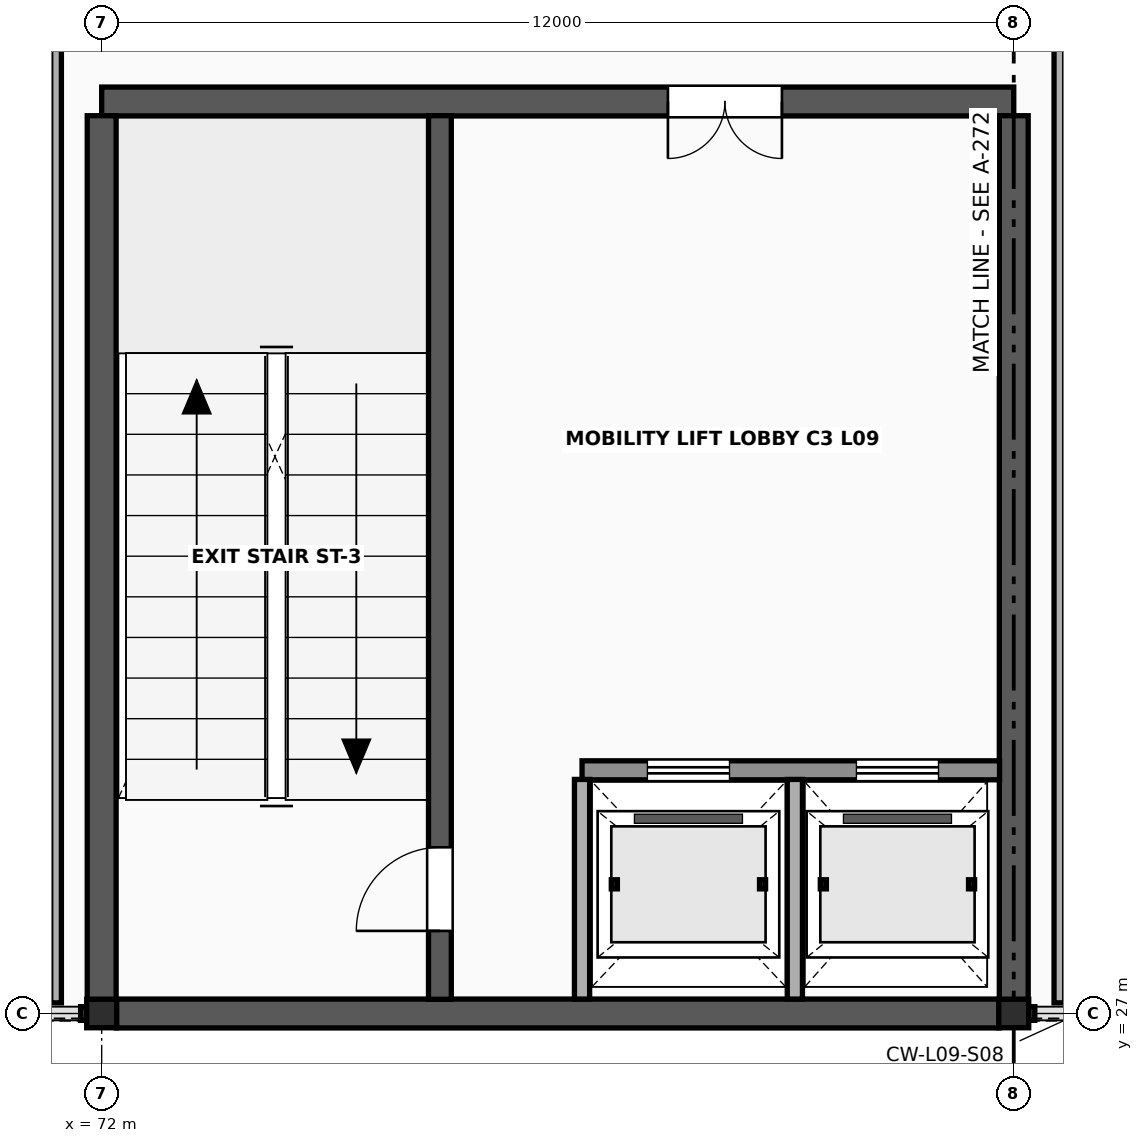
"""IFC4 building model, lengths in metres.
Left out: names, types, materials, properties, quantities, classifications, styles, units other than length and angle.
Written with IfcOpenShell. Run it as: python <this file> out.ifc"""

import sys

from ifc_helpers import new_model, si_unit, direction, frame, frame_2d, origin, origin_2d, place, context, subcontext, project, spatial, rectangle, i_section, extrude, element, fill, save


model = new_model("IFC4")
c1 = context("Model", 3, precision=1e-05, world=origin(), true_north=direction((0.0, 1.0)))
c2 = subcontext(c1, "Body", "Model", "MODEL_VIEW")
j1 = project(units=[si_unit("LENGTHUNIT", "METRE"), si_unit("PLANEANGLEUNIT", "RADIAN")], contexts=[c1])
p1 = place(None, origin())
s1 = spatial("IfcSite", under=j1, at=p1, CompositionType="ELEMENT")
p2 = place(p1, origin())
s2 = spatial("IfcBuilding", under=s1, at=p2, CompositionType="ELEMENT")
p3 = place(p2, frame((0.0, 0.0, 37.6)))
s3 = spatial("IfcBuildingStorey", under=s2, at=p3, CompositionType="ELEMENT", Elevation=37.6)
for number, where, z_axis, x_axis in (
    (1, (72.0, 27.0, 0.0), (0.0, 0.0, 1.0), (1.0, 0.0, 0.0)),
    (2, (84.0, 27.0, 0.0), (0.0, 0.0, 1.0), (1.0, 0.0, 0.0)),
):
    element("IfcColumn", number, at=place(p3, frame(where, z_axis=z_axis, x_axis=x_axis)), inside=s3, PredefinedType="COLUMN", context=c2, shape_type="SweptSolid", body=[
        extrude(i_section(OverallWidth=0.394, OverallDepth=0.375, WebThickness=0.017, FlangeThickness=0.028, FilletRadius=0.018, at=origin_2d()), origin(), (0.0, 0.0, 1.0), 4.0),
    ])
p4 = place(p3, frame((72.194, 27.0, 0.0), z_axis=(0.0, 0.0, 1.0), x_axis=(1.0, 0.0, 0.0)))
e3 = element("IfcWall", 3, at=p4, inside=s3, PredefinedType="SHEAR", context=c2, shape_type="SweptSolid", body=[
    extrude(rectangle(XDim=11.612, YDim=0.38, at=frame_2d((5.806, 0.0))), origin(), (0.0, 0.0, 1.0), 3.838),
])
p5 = place(p3, frame((72.0, 39.0, 0.0), z_axis=(0.0, 0.0, 1.0), x_axis=(1.0, 0.0, 0.0)))
e4 = element("IfcWall", 4, at=p5, inside=s3, PredefinedType="SHEAR", context=c2, shape_type="SweptSolid", body=[
    extrude(rectangle(XDim=12.0, YDim=0.38, at=frame_2d((6.0, 0.0))), origin(), (0.0, 0.0, 1.0), 3.838),
])
p6 = place(p5, frame((7.45, 0.0, 0.0)))
e5 = element("IfcOpeningElement", 5, at=p6, cuts=e4, PredefinedType="OPENING", context=c2, shape_type="SweptSolid", body=[
    extrude(rectangle(XDim=1.5, YDim=2.25, at=frame_2d((0.75, 1.125))), frame((0.0, 0.205, 0.0), z_axis=(0.0, -1.0, 0.0), x_axis=(1.0, 0.0, 0.0)), (0.0, 0.0, 1.0), 0.41),
])
for number, where, z_axis, x_axis in (
    (6, (72.0, 27.185, 0.0), (0.0, 0.0, 1.0), (0.0, 1.0, 0.0)),
    (7, (84.0, 27.185, 0.0), (0.0, 0.0, 1.0), (0.0, 1.0, 0.0)),
):
    element("IfcWall", number, at=place(p3, frame(where, z_axis=z_axis, x_axis=x_axis)), inside=s3, PredefinedType="SHEAR", context=c2, shape_type="SweptSolid", body=[
        extrude(rectangle(XDim=11.628, YDim=0.38, at=frame_2d((5.814, 0.0))), origin(), (0.0, 0.0, 1.0), 3.838),
    ])
p7 = place(p3, frame((76.45, 27.187, 0.0), z_axis=(0.0, 0.0, 1.0), x_axis=(0.0, 1.0, 0.0)))
e8 = element("IfcWall", 8, at=p7, inside=s3, PredefinedType="SHEAR", context=c2, shape_type="SweptSolid", body=[
    extrude(rectangle(XDim=11.626, YDim=0.3, at=frame_2d((5.813, 0.0))), origin(), (0.0, 0.0, 1.0), 3.838),
])
p8 = place(p7, frame((0.9, 0.0, 0.0)))
e9 = element("IfcOpeningElement", 9, at=p8, cuts=e8, PredefinedType="OPENING", context=c2, shape_type="SweptSolid", body=[
    extrude(rectangle(XDim=1.1, YDim=2.2, at=frame_2d((0.55, 1.1))), frame((0.0, 0.165, 0.0), z_axis=(0.0, -1.0, 0.0), x_axis=(1.0, 0.0, 0.0)), (0.0, 0.0, 1.0), 0.33),
])
p9 = place(p3, frame((78.32, 30.2, 0.0), z_axis=(0.0, 0.0, 1.0), x_axis=(1.0, 0.0, 0.0)))
e10 = element("IfcWall", 10, at=p9, inside=s3, PredefinedType="SOLIDWALL", context=c2, shape_type="SweptSolid", body=[
    extrude(rectangle(XDim=5.493, YDim=0.25, at=frame_2d((2.747, 0.0))), origin(), (0.0, 0.0, 1.0), 3.838),
])
p10 = place(p9, frame((0.86, 0.0, 0.0)))
e11 = element("IfcOpeningElement", 11, at=p10, cuts=e10, PredefinedType="OPENING", context=c2, shape_type="SweptSolid", body=[
    extrude(rectangle(XDim=1.08, YDim=2.22, at=frame_2d((0.54, 1.11))), frame((0.0, 0.14, 0.0), z_axis=(0.0, -1.0, 0.0), x_axis=(1.0, 0.0, 0.0)), (0.0, 0.0, 1.0), 0.28),
])
p11 = place(p9, frame((3.61, 0.0, 0.0)))
e12 = element("IfcOpeningElement", 12, at=p11, cuts=e10, PredefinedType="OPENING", context=c2, shape_type="SweptSolid", body=[
    extrude(rectangle(XDim=1.08, YDim=2.22, at=frame_2d((0.54, 1.11))), frame((0.0, 0.14, 0.0), z_axis=(0.0, -1.0, 0.0), x_axis=(1.0, 0.0, 0.0)), (0.0, 0.0, 1.0), 0.28),
])
for number, where, z_axis, x_axis in (
    (13, (78.32, 27.19, 0.0), (0.0, 0.0, 1.0), (0.0, 1.0, 0.0)),
    (14, (81.12, 27.19, 0.0), (0.0, 0.0, 1.0), (0.0, 1.0, 0.0)),
):
    element("IfcWall", number, at=place(p3, frame(where, z_axis=z_axis, x_axis=x_axis)), inside=s3, PredefinedType="SOLIDWALL", context=c2, shape_type="SweptSolid", body=[
        extrude(rectangle(XDim=2.89, YDim=0.2, at=frame_2d((1.445, 0.0))), origin(), (0.0, 0.0, 1.0), 3.828),
    ])
for number, where, z_axis, x_axis in (
    (15, (71.4, 27.14, 0.0), (0.0, 0.0, 1.0), (0.0, 1.0, 0.0)),
    (16, (84.6, 27.14, 0.0), (0.0, 0.0, 1.0), (0.0, 1.0, 0.0)),
):
    element("IfcWall", number, at=place(p3, frame(where, z_axis=z_axis, x_axis=x_axis)), inside=s3, PredefinedType="PARTITIONING", context=c2, shape_type="SweptSolid", body=[
        extrude(rectangle(XDim=25.7, YDim=0.14, at=frame_2d((12.85, 0.0))), origin(), (0.0, 0.0, 1.0), 2.88),
    ])
p12 = place(p8, origin())
e17 = element("IfcDoor", 17, at=p12, inside=s3, OperationType="SINGLE_SWING_LEFT", PredefinedType="DOOR", context=c2, shape_type="SweptSolid", body=[
    extrude(rectangle(XDim=1.1, YDim=2.2, at=frame_2d((0.55, 1.1))), frame((0.0, 0.025, 0.0), z_axis=(0.0, -1.0, 0.0), x_axis=(1.0, 0.0, 0.0)), (0.0, 0.0, 1.0), 0.05),
])
fill(e9, e17)
p13 = place(p6, origin())
e18 = element("IfcDoor", 18, at=p13, inside=s3, OperationType="DOUBLE_DOOR_SINGLE_SWING", PredefinedType="DOOR", context=c2, shape_type="SweptSolid", body=[
    extrude(rectangle(XDim=1.5, YDim=2.25, at=frame_2d((0.75, 1.125))), frame((0.0, 0.025, 0.0), z_axis=(0.0, -1.0, 0.0), x_axis=(1.0, 0.0, 0.0)), (0.0, 0.0, 1.0), 0.05),
])
fill(e5, e18)
p14 = place(p10, origin())
e19 = element("IfcDoor", 19, at=p14, inside=s3, OperationType="SLIDING_TO_LEFT", PredefinedType="USERDEFINED", context=c2, shape_type="SweptSolid", body=[
    extrude(rectangle(XDim=1.08, YDim=2.22, at=frame_2d((0.54, 1.11))), frame((0.0, 0.025, 0.0), z_axis=(0.0, -1.0, 0.0), x_axis=(1.0, 0.0, 0.0)), (0.0, 0.0, 1.0), 0.05),
])
fill(e11, e19)
p15 = place(p11, origin())
e20 = element("IfcDoor", 20, at=p15, inside=s3, OperationType="SLIDING_TO_LEFT", PredefinedType="USERDEFINED", context=c2, shape_type="SweptSolid", body=[
    extrude(rectangle(XDim=1.08, YDim=2.22, at=frame_2d((0.54, 1.11))), frame((0.0, 0.025, 0.0), z_axis=(0.0, -1.0, 0.0), x_axis=(1.0, 0.0, 0.0)), (0.0, 0.0, 1.0), 0.05),
])
fill(e12, e20)
save(model, sys.argv[1])
